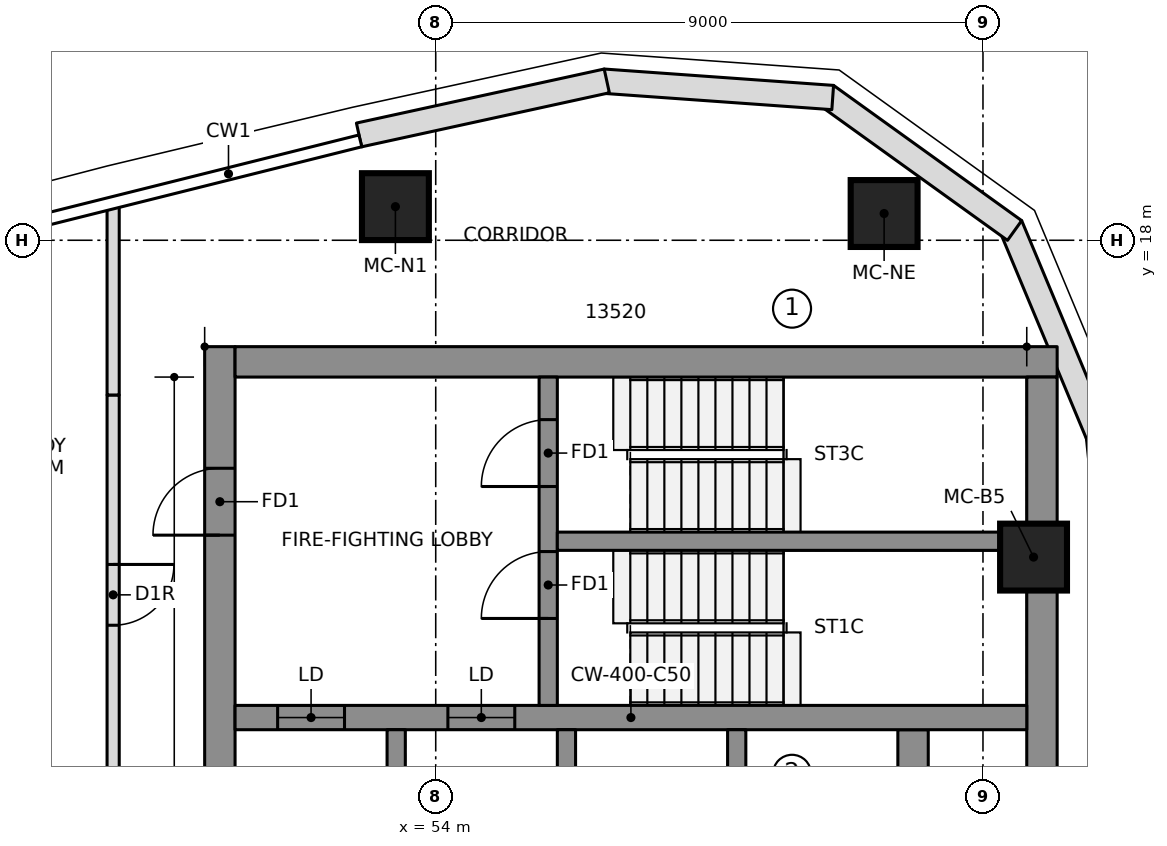
"""IFC4 building model, lengths in metres.
Left out: names, types, materials, properties, quantities, classifications, styles, units other than length and angle.
Written with IfcOpenShell. Run it as: python <this file> out.ifc"""

import sys

from ifc_helpers import new_model, si_unit, direction, frame, frame_2d, origin, origin_2d, place, context, subcontext, project, spatial, polyline, rectangle, outline, extrude, element, fill, save


model = new_model("IFC4")
c1 = context("Model", 3, precision=1e-05, world=origin(), true_north=direction((0.0, 1.0)))
c2 = subcontext(c1, "Body", "Model", "MODEL_VIEW")
j1 = project(units=[si_unit("LENGTHUNIT", "METRE"), si_unit("PLANEANGLEUNIT", "RADIAN")], contexts=[c1])
p1 = place(None, origin())
s1 = spatial("IfcSite", under=j1, at=p1, CompositionType="ELEMENT")
p2 = place(p1, origin())
s2 = spatial("IfcBuilding", under=s1, at=p2, CompositionType="ELEMENT")
p3 = place(p2, frame((0.0, 0.0, 271.45)))
s3 = spatial("IfcBuildingStorey", under=s2, at=p3, CompositionType="ELEMENT", Elevation=271.45)
p4 = place(p3, frame((50.45, 6.65, 0.0), z_axis=(0.0, 0.0, 1.0), x_axis=(0.0, 1.0, 0.0)))
e1 = element("IfcWall", 1, at=p4, inside=s3, PredefinedType="SHEAR", context=c2, shape_type="SweptSolid", body=[
    extrude(rectangle(XDim=9.6, YDim=0.5, at=frame_2d((4.8, 0.0))), origin(), (0.0, 0.0, 1.0), 3.55),
])
p5 = place(p4, frame((6.5, 0.0, 0.0)))
e2 = element("IfcOpeningElement", 2, at=p5, cuts=e1, PredefinedType="OPENING", context=c2, shape_type="SweptSolid", body=[
    extrude(rectangle(XDim=1.1, YDim=2.1, at=frame_2d((0.55, 1.05))), frame((0.0, 0.26, 0.0), z_axis=(0.0, -1.0, 0.0), x_axis=(1.0, 0.0, 0.0)), (0.0, 0.0, 1.0), 0.52),
])
p6 = place(p3, frame((50.7, 16.0, 0.0), z_axis=(0.0, 0.0, 1.0), x_axis=(1.0, 0.0, 0.0)))
e3 = element("IfcWall", 3, at=p6, inside=s3, PredefinedType="SHEAR", context=c2, shape_type="SweptSolid", body=[
    extrude(rectangle(XDim=13.52, YDim=0.5, at=frame_2d((6.76, 0.0))), origin(), (0.0, 0.0, 1.0), 3.55),
])
p7 = place(p3, frame((63.97, 6.903, 0.0), z_axis=(0.0, 0.0, 1.0), x_axis=(0.0, 1.0, 0.0)))
e4 = element("IfcWall", 4, at=p7, inside=s3, PredefinedType="SHEAR", context=c2, shape_type="SweptSolid", body=[
    extrude(rectangle(XDim=8.847, YDim=0.5, at=frame_2d((4.423, 0.0))), origin(), (0.0, 0.0, 1.0), 3.55),
])
p8 = place(p3, frame((61.85, -9.95, 0.0), z_axis=(0.0, 0.0, 1.0), x_axis=(0.0, 1.0, 0.0)))
e5 = element("IfcWall", 5, at=p8, inside=s3, PredefinedType="SHEAR", context=c2, shape_type="SweptSolid", body=[
    extrude(rectangle(XDim=19.9, YDim=0.5, at=frame_2d((9.95, 0.0))), origin(), (0.0, 0.0, 1.0), 3.55),
])
p9 = place(p3, frame((50.7, 10.15, 0.0), z_axis=(0.0, 0.0, 1.0), x_axis=(1.0, 0.0, 0.0)))
e6 = element("IfcWall", 6, at=p9, inside=s3, PredefinedType="SHEAR", context=c2, shape_type="SweptSolid", body=[
    extrude(rectangle(XDim=13.02, YDim=0.4, at=frame_2d((6.51, 0.0))), origin(), (0.0, 0.0, 1.0), 3.55),
])
p10 = place(p9, frame((0.7, 0.0, 0.0)))
e7 = element("IfcOpeningElement", 7, at=p10, cuts=e6, PredefinedType="OPENING", context=c2, shape_type="SweptSolid", body=[
    extrude(rectangle(XDim=1.1, YDim=2.1, at=frame_2d((0.55, 1.05))), frame((0.0, 0.21, 0.0), z_axis=(0.0, -1.0, 0.0), x_axis=(1.0, 0.0, 0.0)), (0.0, 0.0, 1.0), 0.42),
])
p11 = place(p9, frame((3.5, 0.0, 0.0)))
e8 = element("IfcOpeningElement", 8, at=p11, cuts=e6, PredefinedType="OPENING", context=c2, shape_type="SweptSolid", body=[
    extrude(rectangle(XDim=1.1, YDim=2.1, at=frame_2d((0.55, 1.05))), frame((0.0, 0.21, 0.0), z_axis=(0.0, -1.0, 0.0), x_axis=(1.0, 0.0, 0.0)), (0.0, 0.0, 1.0), 0.42),
])
for number, where, z_axis, x_axis in (
    (9, (53.35, 6.95, 0.0), (0.0, 0.0, 1.0), (0.0, 1.0, 0.0)),
    (10, (56.15, 6.95, 0.0), (0.0, 0.0, 1.0), (0.0, 1.0, 0.0)),
    (11, (58.95, 6.95, 0.0), (0.0, 0.0, 1.0), (0.0, 1.0, 0.0)),
):
    element("IfcWall", number, at=place(p3, frame(where, z_axis=z_axis, x_axis=x_axis)), inside=s3, PredefinedType="SHEAR", context=c2, shape_type="SweptSolid", body=[
        extrude(rectangle(XDim=3.0, YDim=0.3, at=frame_2d((1.5, 0.0))), origin(), (0.0, 0.0, 1.0), 3.55),
    ])
p12 = place(p3, frame((55.85, 10.35, 0.0), z_axis=(0.0, 0.0, 1.0), x_axis=(0.0, 1.0, 0.0)))
e12 = element("IfcWall", 12, at=p12, inside=s3, PredefinedType="SHEAR", context=c2, shape_type="SweptSolid", body=[
    extrude(rectangle(XDim=5.4, YDim=0.3, at=frame_2d((2.7, 0.0))), origin(), (0.0, 0.0, 1.0), 3.55),
])
p13 = place(p12, frame((1.43, 0.0, 0.0)))
e13 = element("IfcOpeningElement", 13, at=p13, cuts=e12, PredefinedType="OPENING", context=c2, shape_type="SweptSolid", body=[
    extrude(rectangle(XDim=1.1, YDim=2.1, at=frame_2d((0.55, 1.05))), frame((0.0, 0.16, 0.0), z_axis=(0.0, -1.0, 0.0), x_axis=(1.0, 0.0, 0.0)), (0.0, 0.0, 1.0), 0.32),
])
p14 = place(p12, frame((3.6, 0.0, 0.0)))
e14 = element("IfcOpeningElement", 14, at=p14, cuts=e12, PredefinedType="OPENING", context=c2, shape_type="SweptSolid", body=[
    extrude(rectangle(XDim=1.1, YDim=2.1, at=frame_2d((0.55, 1.05))), frame((0.0, 0.16, 0.0), z_axis=(0.0, -1.0, 0.0), x_axis=(1.0, 0.0, 0.0)), (0.0, 0.0, 1.0), 0.32),
])
p15 = place(p3, frame((56.0, 13.05, 0.0), z_axis=(0.0, 0.0, 1.0), x_axis=(1.0, 0.0, 0.0)))
e15 = element("IfcWall", 15, at=p15, inside=s3, PredefinedType="SHEAR", context=c2, shape_type="SweptSolid", body=[
    extrude(rectangle(XDim=7.72, YDim=0.3, at=frame_2d((3.86, 0.0))), origin(), (0.0, 0.0, 1.0), 3.55),
])
for number, where, z_axis, x_axis in (
    (16, (63.832, 12.789, 0.0), (0.0, 0.0, 1.0), (1.0, 0.0, 0.0)),
    (17, (61.374, 18.44, 0.0), (0.0, 0.0, 1.0), (1.0, 0.0, 0.0)),
    (18, (53.337, 18.553, 0.0), (0.0, 0.0, 1.0), (1.0, 0.0, 0.0)),
):
    element("IfcColumn", number, at=place(p3, frame(where, z_axis=z_axis, x_axis=x_axis)), inside=s3, PredefinedType="COLUMN", context=c2, shape_type="SweptSolid", body=[
        extrude(rectangle(XDim=1.1, YDim=1.1, at=origin_2d()), origin(), (0.0, 0.0, 1.0), 3.55),
    ])
p16 = place(p3, frame((65.331, 10.571, 0.0), z_axis=(0.0, 0.0, 1.0), x_axis=(-0.102249826987, 0.994758751096, 0.0)))
e19 = element("IfcWall", 19, at=p16, inside=s3, PredefinedType="NOTDEFINED", context=c2, shape_type="SweptSolid", body=[
    extrude(outline(polyline([(-0.003, -0.2), (4.263, -0.2), (4.204, 0.2), (0.003, 0.2), (-0.003, -0.2)])), origin(), (0.0, 0.0, 1.0), 3.25),
])
p17 = place(p3, frame((64.898, 14.782, 0.0), z_axis=(0.0, 0.0, 1.0), x_axis=(-0.385285857918, 0.922797273343, 0.0)))
e20 = element("IfcWall", 20, at=p17, inside=s3, PredefinedType="NOTDEFINED", context=c2, shape_type="SweptSolid", body=[
    extrude(outline(polyline([(-0.03, -0.2), (3.753, -0.2), (3.64, 0.2), (0.03, 0.2), (-0.03, -0.2)])), origin(), (0.0, 0.0, 1.0), 3.25),
])
p18 = place(p3, frame((63.474, 18.194, 0.0), z_axis=(0.0, 0.0, 1.0), x_axis=(-0.811962548682, 0.583709533533, 0.0)))
e21 = element("IfcWall", 21, at=p18, inside=s3, PredefinedType="NOTDEFINED", context=c2, shape_type="SweptSolid", body=[
    extrude(outline(polyline([(-0.057, -0.2), (3.753, -0.2), (3.64, 0.2), (0.057, 0.2), (-0.057, -0.2)])), origin(), (0.0, 0.0, 1.0), 3.25),
])
p19 = place(p3, frame((60.472, 20.352, 0.0), z_axis=(0.0, 0.0, 1.0), x_axis=(-0.99746272096, 0.071190731806, 0.0)))
e22 = element("IfcWall", 22, at=p19, inside=s3, PredefinedType="NOTDEFINED", context=c2, shape_type="SweptSolid", body=[
    extrude(outline(polyline([(-0.057, -0.2), (3.726, -0.2), (3.668, 0.2), (0.057, 0.2), (-0.057, -0.2)])), origin(), (0.0, 0.0, 1.0), 3.25),
])
p20 = place(p3, frame((56.785, 20.615, 0.0), z_axis=(0.0, 0.0, 1.0), x_axis=(-0.977020225348, -0.213146614471, 0.0)))
e23 = element("IfcWall", 23, at=p20, inside=s3, PredefinedType="NOTDEFINED", context=c2, shape_type="SweptSolid", body=[
    extrude(outline(polyline([(-0.029, -0.2), (4.142, -0.2), (4.142, 0.2), (0.029, 0.2), (-0.029, -0.2)])), origin(), (0.0, 0.0, 1.0), 3.25),
])
p21 = place(p3, frame((48.695, 15.455, 0.0), z_axis=(0.0, 0.0, 1.0), x_axis=(0.0, -1.0, 0.0)))
e24 = element("IfcWall", 24, at=p21, inside=s3, PredefinedType="PARTITIONING", context=c2, shape_type="SweptSolid", body=[
    extrude(rectangle(XDim=6.603, YDim=0.2, at=frame_2d((3.302, 0.0))), origin(), (0.0, 0.0, 1.0), 3.25),
])
p22 = place(p21, frame((2.787, 0.0, 0.0)))
e25 = element("IfcOpeningElement", 25, at=p22, cuts=e24, PredefinedType="OPENING", context=c2, shape_type="SweptSolid", body=[
    extrude(rectangle(XDim=1.0, YDim=2.1, at=frame_2d((0.5, 1.05))), frame((0.0, 0.11, 0.0), z_axis=(0.0, -1.0, 0.0), x_axis=(1.0, 0.0, 0.0)), (0.0, 0.0, 1.0), 0.22),
])
p23 = place(p3, frame((48.695, 18.553, 0.0), z_axis=(0.0, 0.0, 1.0), x_axis=(0.0, -1.0, 0.0)))
e26 = element("IfcWall", 26, at=p23, inside=s3, PredefinedType="PARTITIONING", context=c2, shape_type="SweptSolid", body=[
    extrude(rectangle(XDim=3.098, YDim=0.2, at=frame_2d((1.549, 0.0))), origin(), (0.0, 0.0, 1.0), 3.25),
])
p24 = place(p22, origin())
e27 = element("IfcDoor", 27, at=p24, inside=s3, OperationType="SINGLE_SWING_RIGHT", PredefinedType="DOOR", context=c2, shape_type="SweptSolid", body=[
    extrude(rectangle(XDim=1.0, YDim=2.1, at=frame_2d((0.5, 1.05))), frame((0.0, 0.025, 0.0), z_axis=(0.0, -1.0, 0.0), x_axis=(1.0, 0.0, 0.0)), (0.0, 0.0, 1.0), 0.05),
])
fill(e25, e27)
p25 = place(p10, origin())
e28 = element("IfcDoor", 28, at=p25, inside=s3, OperationType="DOUBLE_DOOR_SLIDING", PredefinedType="DOOR", context=c2, shape_type="SweptSolid", body=[
    extrude(rectangle(XDim=1.1, YDim=2.1, at=frame_2d((0.55, 1.05))), frame((0.0, 0.025, 0.0), z_axis=(0.0, -1.0, 0.0), x_axis=(1.0, 0.0, 0.0)), (0.0, 0.0, 1.0), 0.05),
])
fill(e7, e28)
p26 = place(p11, origin())
e29 = element("IfcDoor", 29, at=p26, inside=s3, OperationType="DOUBLE_DOOR_SLIDING", PredefinedType="DOOR", context=c2, shape_type="SweptSolid", body=[
    extrude(rectangle(XDim=1.1, YDim=2.1, at=frame_2d((0.55, 1.05))), frame((0.0, 0.025, 0.0), z_axis=(0.0, -1.0, 0.0), x_axis=(1.0, 0.0, 0.0)), (0.0, 0.0, 1.0), 0.05),
])
fill(e8, e29)
p27 = place(p13, origin())
e30 = element("IfcDoor", 30, at=p27, inside=s3, OperationType="SINGLE_SWING_RIGHT", PredefinedType="DOOR", context=c2, shape_type="SweptSolid", body=[
    extrude(rectangle(XDim=1.1, YDim=2.1, at=frame_2d((0.55, 1.05))), frame((0.0, 0.025, 0.0), z_axis=(0.0, -1.0, 0.0), x_axis=(1.0, 0.0, 0.0)), (0.0, 0.0, 1.0), 0.05),
])
fill(e13, e30)
p28 = place(p14, origin())
e31 = element("IfcDoor", 31, at=p28, inside=s3, OperationType="SINGLE_SWING_RIGHT", PredefinedType="DOOR", context=c2, shape_type="SweptSolid", body=[
    extrude(rectangle(XDim=1.1, YDim=2.1, at=frame_2d((0.55, 1.05))), frame((0.0, 0.025, 0.0), z_axis=(0.0, -1.0, 0.0), x_axis=(1.0, 0.0, 0.0)), (0.0, 0.0, 1.0), 0.05),
])
fill(e14, e31)
p29 = place(p5, origin())
e32 = element("IfcDoor", 32, at=p29, inside=s3, OperationType="SINGLE_SWING_RIGHT", PredefinedType="DOOR", context=c2, shape_type="SweptSolid", body=[
    extrude(rectangle(XDim=1.1, YDim=2.1, at=frame_2d((0.55, 1.05))), frame((0.0, 0.025, 0.0), z_axis=(0.0, -1.0, 0.0), x_axis=(1.0, 0.0, 0.0)), (0.0, 0.0, 1.0), 0.05),
])
fill(e2, e32)
save(model, sys.argv[1])
